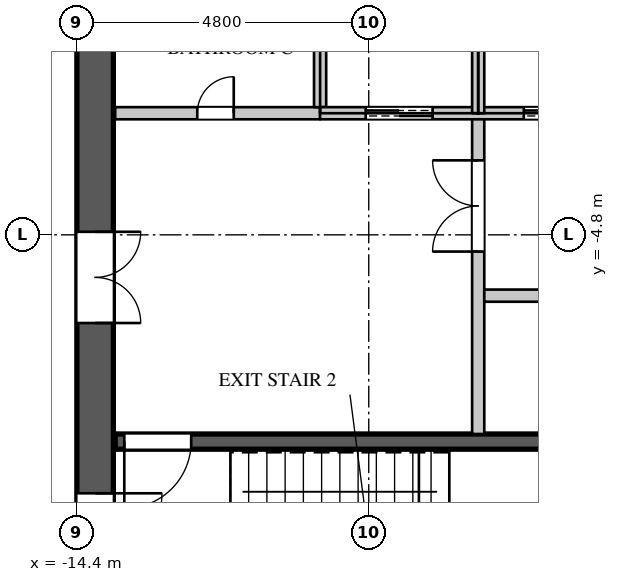
"""IFC4 building model, lengths in metres.
Left out: names, types, materials, properties, quantities, classifications, styles, units other than length and angle.
Written with IfcOpenShell. Run it as: python <this file> out.ifc"""

import sys

from ifc_helpers import new_model, si_unit, direction, frame, frame_2d, origin, place, context, subcontext, project, spatial, rectangle, extrude, element, fill, save


model = new_model("IFC4")
c1 = context("Model", 3, precision=1e-05, world=origin(), true_north=direction((0.0, 1.0)))
c2 = subcontext(c1, "Body", "Model", "MODEL_VIEW")
j1 = project(units=[si_unit("LENGTHUNIT", "METRE"), si_unit("PLANEANGLEUNIT", "RADIAN")], contexts=[c1])
p1 = place(None, origin())
s1 = spatial("IfcSite", under=j1, at=p1, CompositionType="ELEMENT")
p2 = place(p1, origin())
s2 = spatial("IfcBuilding", under=s1, at=p2, CompositionType="ELEMENT")
p3 = place(p2, frame((0.0, 0.0, 213.9)))
s3 = spatial("IfcBuildingStorey", under=s2, at=p3, CompositionType="ELEMENT", Elevation=213.9)
p4 = place(p3, frame((-14.1, -11.4, 0.0), z_axis=(0.0, 0.0, 1.0), x_axis=(0.0, 1.0, 0.0)))
e1 = element("IfcWall", 1, at=p4, inside=s3, PredefinedType="SHEAR", context=c2, shape_type="SweptSolid", body=[
    extrude(rectangle(XDim=22.8, YDim=0.6, at=frame_2d((11.4, 0.0))), origin(), (0.0, 0.0, 1.0), 4.2),
])
p5 = place(p4, frame((20.45, 0.0, 0.0)))
e2 = element("IfcOpeningElement", 2, at=p5, cuts=e1, PredefinedType="OPENING", context=c2, shape_type="SweptSolid", body=[
    extrude(rectangle(XDim=1.1, YDim=2.2, at=frame_2d((0.55, 1.1))), frame((0.0, 0.31, 0.0), z_axis=(0.0, -1.0, 0.0), x_axis=(1.0, 0.0, 0.0)), (0.0, 0.0, 1.0), 0.62),
])
p6 = place(p4, frame((1.25, 0.0, 0.0)))
e3 = element("IfcOpeningElement", 3, at=p6, cuts=e1, PredefinedType="OPENING", context=c2, shape_type="SweptSolid", body=[
    extrude(rectangle(XDim=1.1, YDim=2.2, at=frame_2d((0.55, 1.1))), frame((0.0, 0.31, 0.0), z_axis=(0.0, -1.0, 0.0), x_axis=(1.0, 0.0, 0.0)), (0.0, 0.0, 1.0), 0.62),
])
p7 = place(p4, frame((16.15, 0.0, 0.0)))
e4 = element("IfcOpeningElement", 4, at=p7, cuts=e1, PredefinedType="OPENING", context=c2, shape_type="SweptSolid", body=[
    extrude(rectangle(XDim=1.5, YDim=2.4, at=frame_2d((0.75, 1.2))), frame((0.0, 0.31, 0.0), z_axis=(0.0, -1.0, 0.0), x_axis=(1.0, 0.0, 0.0)), (0.0, 0.0, 1.0), 0.62),
])
p8 = place(p4, frame((5.15, 0.0, 0.0)))
e5 = element("IfcOpeningElement", 5, at=p8, cuts=e1, PredefinedType="OPENING", context=c2, shape_type="SweptSolid", body=[
    extrude(rectangle(XDim=1.5, YDim=2.4, at=frame_2d((0.75, 1.2))), frame((0.0, 0.31, 0.0), z_axis=(0.0, -1.0, 0.0), x_axis=(1.0, 0.0, 0.0)), (0.0, 0.0, 1.0), 0.62),
])
p9 = place(p3, frame((-7.8, -8.075, 0.0), z_axis=(0.0, 0.0, 1.0), x_axis=(0.0, 1.0, 0.0)))
e6 = element("IfcWall", 6, at=p9, inside=s3, PredefinedType="PARTITIONING", context=c2, shape_type="SweptSolid", body=[
    extrude(rectangle(XDim=5.275, YDim=0.2, at=frame_2d((2.637, 0.0))), origin(), (0.0, 0.0, 1.0), 3.95),
])
p10 = place(p9, frame((3.0, 0.0, 0.0)))
e7 = element("IfcOpeningElement", 7, at=p10, cuts=e6, PredefinedType="OPENING", context=c2, shape_type="SweptSolid", body=[
    extrude(rectangle(XDim=1.5, YDim=2.4, at=frame_2d((0.75, 1.2))), frame((0.0, 0.11, 0.0), z_axis=(0.0, -1.0, 0.0), x_axis=(1.0, 0.0, 0.0)), (0.0, 0.0, 1.0), 0.22),
])
p11 = place(p3, frame((-7.7, -5.8, 0.0), z_axis=(0.0, 0.0, 1.0), x_axis=(1.0, 0.0, 0.0)))
e8 = element("IfcWall", 8, at=p11, inside=s3, PredefinedType="PARTITIONING", context=c2, shape_type="SweptSolid", body=[
    extrude(rectangle(XDim=21.47, YDim=0.2, at=frame_2d((10.735, 0.0))), origin(), (0.0, 0.0, 1.0), 3.95),
])
p12 = place(p11, frame((1.75, 0.0, 0.0)))
e9 = element("IfcOpeningElement", 9, at=p12, cuts=e8, PredefinedType="OPENING", context=c2, shape_type="SweptSolid", body=[
    extrude(rectangle(XDim=0.9, YDim=2.2, at=frame_2d((0.45, 1.1))), frame((0.0, 0.11, 0.0), z_axis=(0.0, -1.0, 0.0), x_axis=(1.0, 0.0, 0.0)), (0.0, 0.0, 1.0), 0.22),
])
p13 = place(p11, frame((5.95, 0.0, 0.0)))
e10 = element("IfcOpeningElement", 10, at=p13, cuts=e8, PredefinedType="OPENING", context=c2, shape_type="SweptSolid", body=[
    extrude(rectangle(XDim=0.9, YDim=2.2, at=frame_2d((0.45, 1.1))), frame((0.0, 0.11, 0.0), z_axis=(0.0, -1.0, 0.0), x_axis=(1.0, 0.0, 0.0)), (0.0, 0.0, 1.0), 0.22),
])
p14 = place(p11, frame((10.35, 0.0, 0.0)))
e11 = element("IfcOpeningElement", 11, at=p14, cuts=e8, PredefinedType="OPENING", context=c2, shape_type="SweptSolid", body=[
    extrude(rectangle(XDim=0.9, YDim=2.2, at=frame_2d((0.45, 1.1))), frame((0.0, 0.11, 0.0), z_axis=(0.0, -1.0, 0.0), x_axis=(1.0, 0.0, 0.0)), (0.0, 0.0, 1.0), 0.22),
])
p15 = place(p11, frame((14.65, 0.0, 0.0)))
e12 = element("IfcOpeningElement", 12, at=p15, cuts=e8, PredefinedType="OPENING", context=c2, shape_type="SweptSolid", body=[
    extrude(rectangle(XDim=0.9, YDim=2.2, at=frame_2d((0.45, 1.1))), frame((0.0, 0.11, 0.0), z_axis=(0.0, -1.0, 0.0), x_axis=(1.0, 0.0, 0.0)), (0.0, 0.0, 1.0), 0.22),
])
p16 = place(p11, frame((18.75, 0.0, 0.0)))
e13 = element("IfcOpeningElement", 13, at=p16, cuts=e8, PredefinedType="OPENING", context=c2, shape_type="SweptSolid", body=[
    extrude(rectangle(XDim=0.9, YDim=2.2, at=frame_2d((0.45, 1.1))), frame((0.0, 0.11, 0.0), z_axis=(0.0, -1.0, 0.0), x_axis=(1.0, 0.0, 0.0)), (0.0, 0.0, 1.0), 0.22),
])
p17 = place(p3, frame((-13.77, -2.8, 0.0), z_axis=(0.0, 0.0, 1.0), x_axis=(1.0, 0.0, 0.0)))
e14 = element("IfcWall", 14, at=p17, inside=s3, PredefinedType="PARTITIONING", context=c2, shape_type="SweptSolid", body=[
    extrude(rectangle(XDim=3.37, YDim=0.2, at=frame_2d((1.685, 0.0))), origin(), (0.0, 0.0, 1.0), 3.95),
])
p18 = place(p17, frame((1.35, 0.0, 0.0)))
e15 = element("IfcOpeningElement", 15, at=p18, cuts=e14, PredefinedType="OPENING", context=c2, shape_type="SweptSolid", body=[
    extrude(rectangle(XDim=0.6, YDim=2.0, at=frame_2d((0.3, 1.0))), frame((0.0, 0.11, 0.0), z_axis=(0.0, -1.0, 0.0), x_axis=(1.0, 0.0, 0.0)), (0.0, 0.0, 1.0), 0.22),
])
p19 = place(p3, frame((-10.4, -2.7, 0.0), z_axis=(0.0, 0.0, 1.0), x_axis=(0.0, 1.0, 0.0)))
e16 = element("IfcWall", 16, at=p19, inside=s3, PredefinedType="PARTITIONING", context=c2, shape_type="SweptSolid", body=[
    extrude(rectangle(XDim=2.7, YDim=0.2, at=frame_2d((1.35, 0.0))), origin(), (0.0, 0.0, 1.0), 3.95),
])
p20 = place(p3, frame((-10.4, -2.8, 0.0), z_axis=(0.0, 0.0, 1.0), x_axis=(1.0, 0.0, 0.0)))
e17 = element("IfcWall", 17, at=p20, inside=s3, PredefinedType="PARTITIONING", context=c2, shape_type="SweptSolid", body=[
    extrude(rectangle(XDim=18.2, YDim=0.2, at=frame_2d((9.1, 0.0))), origin(), (0.0, 0.0, 1.0), 3.95),
])
p21 = place(p20, frame((0.75, 0.0, 0.0)))
e18 = element("IfcOpeningElement", 18, at=p21, cuts=e17, PredefinedType="OPENING", context=c2, shape_type="SweptSolid", body=[
    extrude(rectangle(XDim=1.1, YDim=2.2, at=frame_2d((0.55, 1.1))), frame((0.0, 0.11, 0.0), z_axis=(0.0, -1.0, 0.0), x_axis=(1.0, 0.0, 0.0)), (0.0, 0.0, 1.0), 0.22),
])
p22 = place(p20, frame((3.35, 0.0, 0.0)))
e19 = element("IfcOpeningElement", 19, at=p22, cuts=e17, PredefinedType="OPENING", context=c2, shape_type="SweptSolid", body=[
    extrude(rectangle(XDim=1.1, YDim=2.2, at=frame_2d((0.55, 1.1))), frame((0.0, 0.11, 0.0), z_axis=(0.0, -1.0, 0.0), x_axis=(1.0, 0.0, 0.0)), (0.0, 0.0, 1.0), 0.22),
])
p23 = place(p20, frame((5.95, 0.0, 0.0)))
e20 = element("IfcOpeningElement", 20, at=p23, cuts=e17, PredefinedType="OPENING", context=c2, shape_type="SweptSolid", body=[
    extrude(rectangle(XDim=1.1, YDim=2.2, at=frame_2d((0.55, 1.1))), frame((0.0, 0.11, 0.0), z_axis=(0.0, -1.0, 0.0), x_axis=(1.0, 0.0, 0.0)), (0.0, 0.0, 1.0), 0.22),
])
p24 = place(p20, frame((8.55, 0.0, 0.0)))
e21 = element("IfcOpeningElement", 21, at=p24, cuts=e17, PredefinedType="OPENING", context=c2, shape_type="SweptSolid", body=[
    extrude(rectangle(XDim=1.1, YDim=2.2, at=frame_2d((0.55, 1.1))), frame((0.0, 0.11, 0.0), z_axis=(0.0, -1.0, 0.0), x_axis=(1.0, 0.0, 0.0)), (0.0, 0.0, 1.0), 0.22),
])
p25 = place(p20, frame((11.15, 0.0, 0.0)))
e22 = element("IfcOpeningElement", 22, at=p25, cuts=e17, PredefinedType="OPENING", context=c2, shape_type="SweptSolid", body=[
    extrude(rectangle(XDim=1.1, YDim=2.2, at=frame_2d((0.55, 1.1))), frame((0.0, 0.11, 0.0), z_axis=(0.0, -1.0, 0.0), x_axis=(1.0, 0.0, 0.0)), (0.0, 0.0, 1.0), 0.22),
])
p26 = place(p20, frame((13.75, 0.0, 0.0)))
e23 = element("IfcOpeningElement", 23, at=p26, cuts=e17, PredefinedType="OPENING", context=c2, shape_type="SweptSolid", body=[
    extrude(rectangle(XDim=1.1, YDim=2.2, at=frame_2d((0.55, 1.1))), frame((0.0, 0.11, 0.0), z_axis=(0.0, -1.0, 0.0), x_axis=(1.0, 0.0, 0.0)), (0.0, 0.0, 1.0), 0.22),
])
p27 = place(p20, frame((16.35, 0.0, 0.0)))
e24 = element("IfcOpeningElement", 24, at=p27, cuts=e17, PredefinedType="OPENING", context=c2, shape_type="SweptSolid", body=[
    extrude(rectangle(XDim=1.1, YDim=2.2, at=frame_2d((0.55, 1.1))), frame((0.0, 0.11, 0.0), z_axis=(0.0, -1.0, 0.0), x_axis=(1.0, 0.0, 0.0)), (0.0, 0.0, 1.0), 0.22),
])
p28 = place(p3, frame((-7.8, -2.8, 0.0), z_axis=(0.0, 0.0, 1.0), x_axis=(0.0, 1.0, 0.0)))
e25 = element("IfcWall", 25, at=p28, inside=s3, PredefinedType="PARTITIONING", context=c2, shape_type="SweptSolid", body=[
    extrude(rectangle(XDim=2.8, YDim=0.2, at=frame_2d((1.4, 0.0))), origin(), (0.0, 0.0, 1.0), 3.95),
])
p29 = place(p3, frame((-13.77, -8.2, 0.0), z_axis=(0.0, 0.0, 1.0), x_axis=(1.0, 0.0, 0.0)))
e26 = element("IfcWall", 26, at=p29, inside=s3, PredefinedType="SHEAR", context=c2, shape_type="SweptSolid", body=[
    extrude(rectangle(XDim=8.495, YDim=0.25, at=frame_2d((4.248, 0.0))), origin(), (0.0, 0.0, 1.0), 3.95),
])
p30 = place(p29, frame((0.15, 0.0, 0.0)))
e27 = element("IfcOpeningElement", 27, at=p30, cuts=e26, PredefinedType="OPENING", context=c2, shape_type="SweptSolid", body=[
    extrude(rectangle(XDim=1.1, YDim=2.2, at=frame_2d((0.55, 1.1))), frame((0.0, 0.135, 0.0), z_axis=(0.0, -1.0, 0.0), x_axis=(1.0, 0.0, 0.0)), (0.0, 0.0, 1.0), 0.27),
])
p31 = place(p18, origin())
e28 = element("IfcDoor", 28, at=p31, inside=s3, OperationType="SINGLE_SWING_RIGHT", PredefinedType="DOOR", context=c2, shape_type="SweptSolid", body=[
    extrude(rectangle(XDim=0.6, YDim=2.0, at=frame_2d((0.3, 1.0))), frame((0.0, 0.025, 0.0), z_axis=(0.0, -1.0, 0.0), x_axis=(1.0, 0.0, 0.0)), (0.0, 0.0, 1.0), 0.05),
])
fill(e15, e28)
p32 = place(p21, origin())
e29 = element("IfcDoor", 29, at=p32, inside=s3, OperationType="DOUBLE_DOOR_SLIDING", PredefinedType="DOOR", context=c2, shape_type="SweptSolid", body=[
    extrude(rectangle(XDim=1.1, YDim=2.2, at=frame_2d((0.55, 1.1))), frame((0.0, 0.025, 0.0), z_axis=(0.0, -1.0, 0.0), x_axis=(1.0, 0.0, 0.0)), (0.0, 0.0, 1.0), 0.05),
])
fill(e18, e29)
p33 = place(p22, origin())
e30 = element("IfcDoor", 30, at=p33, inside=s3, OperationType="DOUBLE_DOOR_SLIDING", PredefinedType="DOOR", context=c2, shape_type="SweptSolid", body=[
    extrude(rectangle(XDim=1.1, YDim=2.2, at=frame_2d((0.55, 1.1))), frame((0.0, 0.025, 0.0), z_axis=(0.0, -1.0, 0.0), x_axis=(1.0, 0.0, 0.0)), (0.0, 0.0, 1.0), 0.05),
])
fill(e19, e30)
p34 = place(p30, origin())
e31 = element("IfcDoor", 31, at=p34, inside=s3, OperationType="SINGLE_SWING_RIGHT", PredefinedType="DOOR", context=c2, shape_type="SweptSolid", body=[
    extrude(rectangle(XDim=1.1, YDim=2.2, at=frame_2d((0.55, 1.1))), frame((0.0, 0.025, 0.0), z_axis=(0.0, -1.0, 0.0), x_axis=(1.0, 0.0, 0.0)), (0.0, 0.0, 1.0), 0.05),
])
fill(e27, e31)
p35 = place(p10, origin())
e32 = element("IfcDoor", 32, at=p35, inside=s3, OperationType="DOUBLE_DOOR_SINGLE_SWING", PredefinedType="DOOR", context=c2, shape_type="SweptSolid", body=[
    extrude(rectangle(XDim=1.5, YDim=2.4, at=frame_2d((0.75, 1.2))), frame((0.0, 0.025, 0.0), z_axis=(0.0, -1.0, 0.0), x_axis=(1.0, 0.0, 0.0)), (0.0, 0.0, 1.0), 0.05),
])
fill(e7, e32)
p36 = place(p6, origin())
e33 = element("IfcDoor", 33, at=p36, inside=s3, OperationType="SINGLE_SWING_LEFT", PredefinedType="DOOR", context=c2, shape_type="SweptSolid", body=[
    extrude(rectangle(XDim=1.1, YDim=2.2, at=frame_2d((0.55, 1.1))), frame((0.0, -0.245, 0.0), z_axis=(0.0, -1.0, 0.0), x_axis=(1.0, 0.0, 0.0)), (0.0, 0.0, 1.0), 0.05),
])
fill(e3, e33)
p37 = place(p8, origin())
e34 = element("IfcDoor", 34, at=p37, inside=s3, OperationType="DOUBLE_DOOR_SINGLE_SWING", PredefinedType="DOOR", context=c2, shape_type="SweptSolid", body=[
    extrude(rectangle(XDim=1.5, YDim=2.4, at=frame_2d((0.75, 1.2))), frame((0.0, -0.245, 0.0), z_axis=(0.0, -1.0, 0.0), x_axis=(1.0, 0.0, 0.0)), (0.0, 0.0, 1.0), 0.05),
])
fill(e5, e34)
save(model, sys.argv[1])
